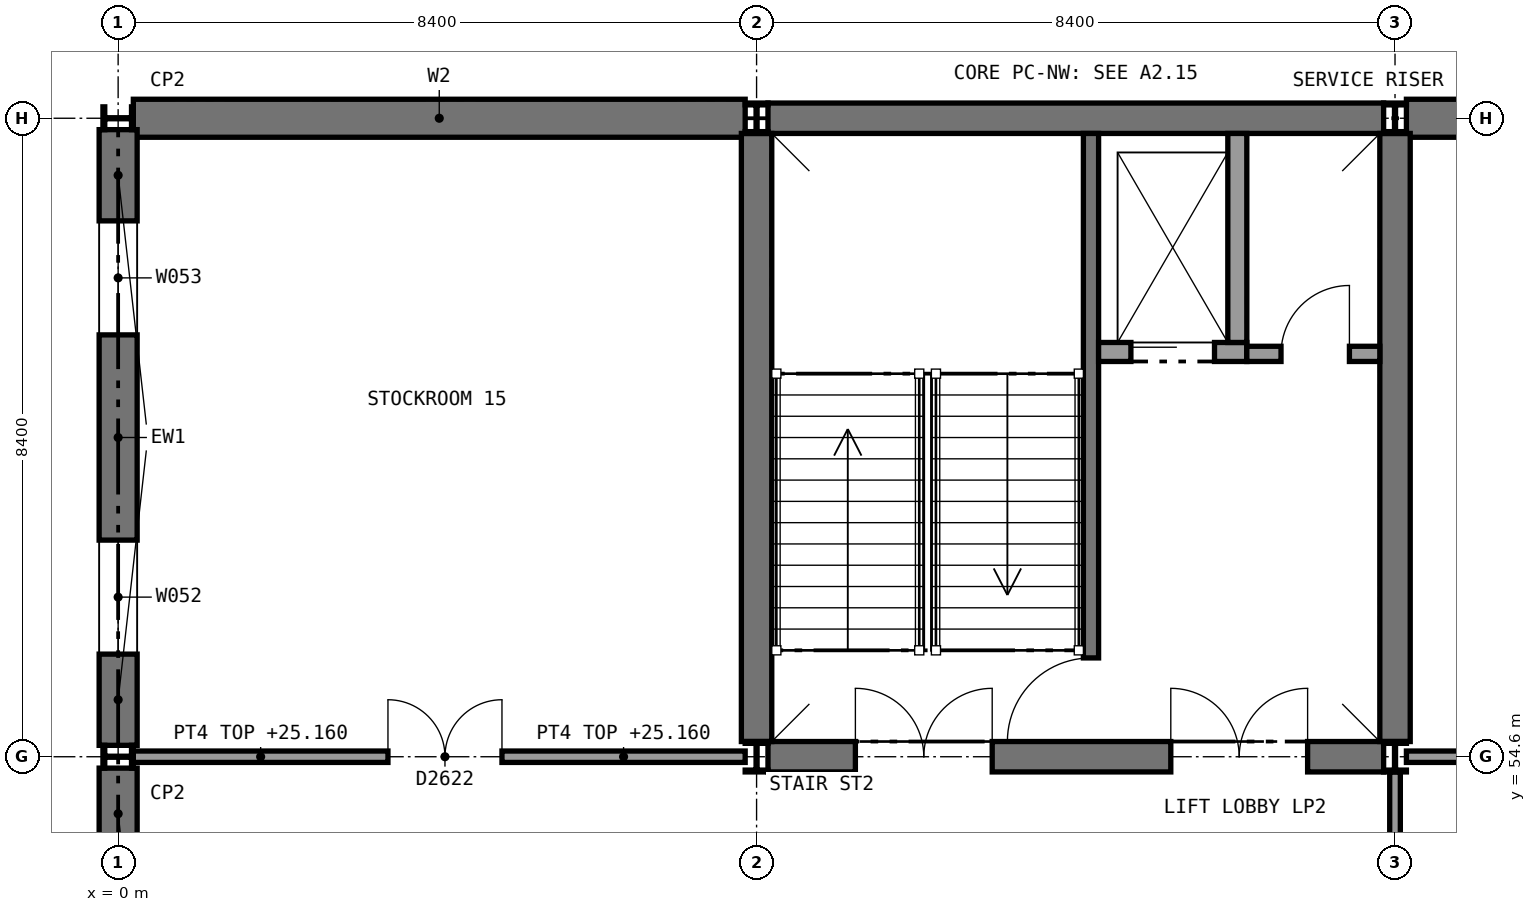
"""IFC4 building model, lengths in metres.
Left out: names, types, materials, properties, quantities, classifications, styles, units other than length and angle.
Written with IfcOpenShell. Run it as: python <this file> out.ifc"""

import sys

from ifc_helpers import new_model, si_unit, direction, frame, frame_2d, origin, origin_2d, place, context, subcontext, project, spatial, rectangle, i_section, extrude, element, fill, save


model = new_model("IFC4")
c1 = context("Model", 3, precision=1e-05, world=origin(), true_north=direction((0.0, 1.0)))
c2 = subcontext(c1, "Body", "Model", "MODEL_VIEW")
j1 = project(units=[si_unit("LENGTHUNIT", "METRE"), si_unit("PLANEANGLEUNIT", "RADIAN")], contexts=[c1])
p1 = place(None, origin())
s1 = spatial("IfcSite", under=j1, at=p1, CompositionType="ELEMENT")
p2 = place(p1, origin())
s2 = spatial("IfcBuilding", under=s1, at=p2, CompositionType="ELEMENT")
p3 = place(p2, frame((0.0, 0.0, 21.0)))
s3 = spatial("IfcBuildingStorey", under=s2, at=p3, CompositionType="ELEMENT", Elevation=21.0)
p4 = place(p3, frame((0.2, 63.0, 0.0), z_axis=(0.0, 0.0, 1.0), x_axis=(1.0, 0.0, 0.0)))
e1 = element("IfcWall", 1, at=p4, inside=s3, PredefinedType="SHEAR", context=c2, shape_type="SweptSolid", body=[
    extrude(rectangle(XDim=8.05, YDim=0.5, at=frame_2d((4.025, 0.0))), origin(), (0.0, 0.0, 1.0), 4.65),
])
p5 = place(p3, frame((16.95, 63.0, 0.0), z_axis=(0.0, 0.0, 1.0), x_axis=(1.0, 0.0, 0.0)))
e2 = element("IfcWall", 2, at=p5, inside=s3, PredefinedType="SHEAR", context=c2, shape_type="SweptSolid", body=[
    extrude(rectangle(XDim=8.1, YDim=0.5, at=frame_2d((4.05, 0.0))), origin(), (0.0, 0.0, 1.0), 4.65),
])
p6 = place(p3, frame((8.55, 63.0, 0.0), z_axis=(0.0, 0.0, 1.0), x_axis=(1.0, 0.0, 0.0)))
e3 = element("IfcWall", 3, at=p6, inside=s3, PredefinedType="SHEAR", context=c2, shape_type="SweptSolid", body=[
    extrude(rectangle(XDim=8.1, YDim=0.4, at=frame_2d((4.05, 0.0))), origin(), (0.0, 0.0, 1.0), 4.65),
])
p7 = place(p3, frame((8.55, 54.6, 0.0), z_axis=(0.0, 0.0, 1.0), x_axis=(1.0, 0.0, 0.0)))
e4 = element("IfcWall", 4, at=p7, inside=s3, PredefinedType="SHEAR", context=c2, shape_type="SweptSolid", body=[
    extrude(rectangle(XDim=8.1, YDim=0.4, at=frame_2d((4.05, 0.0))), origin(), (0.0, 0.0, 1.0), 4.65),
])
p8 = place(p7, frame((1.15, 0.0, 0.0)))
e5 = element("IfcOpeningElement", 5, at=p8, cuts=e4, PredefinedType="OPENING", context=c2, shape_type="SweptSolid", body=[
    extrude(rectangle(XDim=1.8, YDim=2.1, at=frame_2d((0.9, 1.05))), frame((0.0, 0.21, 0.0), z_axis=(0.0, -1.0, 0.0), x_axis=(1.0, 0.0, 0.0)), (0.0, 0.0, 1.0), 0.42),
])
p9 = place(p7, frame((5.3, 0.0, 0.0)))
e6 = element("IfcOpeningElement", 6, at=p9, cuts=e4, PredefinedType="OPENING", context=c2, shape_type="SweptSolid", body=[
    extrude(rectangle(XDim=1.8, YDim=2.1, at=frame_2d((0.9, 1.05))), frame((0.0, 0.21, 0.0), z_axis=(0.0, -1.0, 0.0), x_axis=(1.0, 0.0, 0.0)), (0.0, 0.0, 1.0), 0.42),
])
for number, where, z_axis, x_axis in (
    (7, (8.4, 54.8, 0.0), (0.0, 0.0, 1.0), (0.0, 1.0, 0.0)),
    (8, (16.8, 54.8, 0.0), (0.0, 0.0, 1.0), (0.0, 1.0, 0.0)),
):
    element("IfcWall", number, at=place(p3, frame(where, z_axis=z_axis, x_axis=x_axis)), inside=s3, PredefinedType="SHEAR", context=c2, shape_type="SweptSolid", body=[
        extrude(rectangle(XDim=8.0, YDim=0.4, at=frame_2d((4.0, 0.0))), origin(), (0.0, 0.0, 1.0), 4.65),
    ])
for number, where, z_axis, x_axis in (
    (9, (0.0, 54.6, 0.0), (0.0, 0.0, 1.0), (0.0, 1.0, 0.0)),
    (10, (0.0, 63.0, 0.0), (0.0, 0.0, 1.0), (0.0, 1.0, 0.0)),
    (11, (8.4, 54.6, 0.0), (0.0, 0.0, 1.0), (1.0, 0.0, 0.0)),
    (12, (8.4, 63.0, 0.0), (0.0, 0.0, 1.0), (1.0, 0.0, 0.0)),
    (13, (16.8, 54.6, 0.0), (0.0, 0.0, 1.0), (1.0, 0.0, 0.0)),
    (14, (16.8, 63.0, 0.0), (0.0, 0.0, 1.0), (1.0, 0.0, 0.0)),
):
    element("IfcColumn", number, at=place(p3, frame(where, z_axis=z_axis, x_axis=x_axis)), inside=s3, PredefinedType="COLUMN", context=c2, shape_type="SweptSolid", body=[
        extrude(i_section(OverallWidth=0.3, OverallDepth=0.4, WebThickness=0.013, FlangeThickness=0.024, FilletRadius=0.027, at=origin_2d()), origin(), (0.0, 0.0, 1.0), 4.8),
    ])
p10 = place(p3, frame((16.95, 54.6, 0.0), z_axis=(0.0, 0.0, 1.0), x_axis=(1.0, 0.0, 0.0)))
e15 = element("IfcWall", 15, at=p10, inside=s3, PredefinedType="SOLIDWALL", context=c2, shape_type="SweptSolid", body=[
    extrude(rectangle(XDim=8.1, YDim=0.15, at=frame_2d((4.05, 0.0))), origin(), (0.0, 0.0, 1.0), 4.3),
])
p11 = place(p10, frame((3.35, 0.0, 0.0)))
e16 = element("IfcOpeningElement", 16, at=p11, cuts=e15, PredefinedType="OPENING", context=c2, shape_type="SweptSolid", body=[
    extrude(rectangle(XDim=1.5, YDim=2.1, at=frame_2d((0.75, 1.05))), frame((0.0, 0.085, 0.0), z_axis=(0.0, -1.0, 0.0), x_axis=(1.0, 0.0, 0.0)), (0.0, 0.0, 1.0), 0.17),
])
p12 = place(p3, frame((0.2, 54.6, 0.0), z_axis=(0.0, 0.0, 1.0), x_axis=(1.0, 0.0, 0.0)))
e17 = element("IfcWall", 17, at=p12, inside=s3, PredefinedType="SOLIDWALL", context=c2, shape_type="SweptSolid", body=[
    extrude(rectangle(XDim=8.05, YDim=0.15, at=frame_2d((4.025, 0.0))), origin(), (0.0, 0.0, 1.0), 4.16),
])
p13 = place(p12, frame((3.35, 0.0, 0.0)))
e18 = element("IfcOpeningElement", 18, at=p13, cuts=e17, PredefinedType="OPENING", context=c2, shape_type="SweptSolid", body=[
    extrude(rectangle(XDim=1.5, YDim=2.1, at=frame_2d((0.75, 1.05))), frame((0.0, 0.085, 0.0), z_axis=(0.0, -1.0, 0.0), x_axis=(1.0, 0.0, 0.0)), (0.0, 0.0, 1.0), 0.17),
])
p14 = place(p3, frame((16.8, 51.3, 0.0), z_axis=(0.0, 0.0, 1.0), x_axis=(0.0, 1.0, 0.0)))
e19 = element("IfcWall", 19, at=p14, inside=s3, PredefinedType="PARTITIONING", context=c2, shape_type="SweptSolid", body=[
    extrude(rectangle(XDim=3.1, YDim=0.14, at=frame_2d((1.55, 0.0))), origin(), (0.0, 0.0, 1.0), 4.16),
])
p15 = place(p3, frame((0.0, 46.35, 0.0), z_axis=(0.0, 0.0, 1.0), x_axis=(0.0, 1.0, 0.0)))
e20 = element("IfcWall", 20, at=p15, inside=s3, PredefinedType="STANDARD", context=c2, shape_type="SweptSolid", body=[
    extrude(rectangle(XDim=8.1, YDim=0.5, at=frame_2d((4.05, 0.0))), origin(), (0.0, 0.0, 1.0), 4.65),
])
p16 = place(p15, frame((1.2, 0.0, 1.0)))
e21 = element("IfcOpeningElement", 21, at=p16, cuts=e20, PredefinedType="OPENING", context=c2, shape_type="SweptSolid", body=[
    extrude(rectangle(XDim=1.5, YDim=2.4, at=frame_2d((0.75, 1.2))), frame((0.0, 0.26, 0.0), z_axis=(0.0, -1.0, 0.0), x_axis=(1.0, 0.0, 0.0)), (0.0, 0.0, 1.0), 0.52),
])
p17 = place(p15, frame((5.4, 0.0, 1.0)))
e22 = element("IfcOpeningElement", 22, at=p17, cuts=e20, PredefinedType="OPENING", context=c2, shape_type="SweptSolid", body=[
    extrude(rectangle(XDim=1.5, YDim=2.4, at=frame_2d((0.75, 1.2))), frame((0.0, 0.26, 0.0), z_axis=(0.0, -1.0, 0.0), x_axis=(1.0, 0.0, 0.0)), (0.0, 0.0, 1.0), 0.52),
])
p18 = place(p3, frame((0.0, 54.75, 0.0), z_axis=(0.0, 0.0, 1.0), x_axis=(0.0, 1.0, 0.0)))
e23 = element("IfcWall", 23, at=p18, inside=s3, PredefinedType="STANDARD", context=c2, shape_type="SweptSolid", body=[
    extrude(rectangle(XDim=8.1, YDim=0.5, at=frame_2d((4.05, 0.0))), origin(), (0.0, 0.0, 1.0), 4.65),
])
p19 = place(p18, frame((1.2, 0.0, 1.0)))
e24 = element("IfcOpeningElement", 24, at=p19, cuts=e23, PredefinedType="OPENING", context=c2, shape_type="SweptSolid", body=[
    extrude(rectangle(XDim=1.5, YDim=2.4, at=frame_2d((0.75, 1.2))), frame((0.0, 0.26, 0.0), z_axis=(0.0, -1.0, 0.0), x_axis=(1.0, 0.0, 0.0)), (0.0, 0.0, 1.0), 0.52),
])
p20 = place(p18, frame((5.4, 0.0, 1.0)))
e25 = element("IfcOpeningElement", 25, at=p20, cuts=e23, PredefinedType="OPENING", context=c2, shape_type="SweptSolid", body=[
    extrude(rectangle(XDim=1.5, YDim=2.4, at=frame_2d((0.75, 1.2))), frame((0.0, 0.26, 0.0), z_axis=(0.0, -1.0, 0.0), x_axis=(1.0, 0.0, 0.0)), (0.0, 0.0, 1.0), 0.52),
])
p21 = place(p3, frame((12.8, 62.8, 0.0), z_axis=(0.0, 0.0, 1.0), x_axis=(0.0, -1.0, 0.0)))
e26 = element("IfcWall", 26, at=p21, inside=s3, PredefinedType="SHEAR", context=c2, shape_type="SweptSolid", body=[
    extrude(rectangle(XDim=8.0, YDim=0.2, at=frame_2d((4.0, 0.0))), origin(), (0.0, 0.0, 1.0), 4.65),
])
p22 = place(p21, frame((6.9, 0.0, 0.0)))
e27 = element("IfcOpeningElement", 27, at=p22, cuts=e26, PredefinedType="OPENING", context=c2, shape_type="SweptSolid", body=[
    extrude(rectangle(XDim=1.11, YDim=2.1, at=frame_2d((0.555, 1.05))), frame((0.0, 0.11, 0.0), z_axis=(0.0, -1.0, 0.0), x_axis=(1.0, 0.0, 0.0)), (0.0, 0.0, 1.0), 0.22),
])
p23 = place(p3, frame((12.9, 59.925, 0.0), z_axis=(0.0, 0.0, 1.0), x_axis=(1.0, 0.0, 0.0)))
e28 = element("IfcWall", 28, at=p23, inside=s3, PredefinedType="SOLIDWALL", context=c2, shape_type="SweptSolid", body=[
    extrude(rectangle(XDim=1.95, YDim=0.25, at=frame_2d((0.975, 0.0))), origin(), (0.0, 0.0, 1.0), 4.8),
])
p24 = place(p23, frame((0.425, 0.0, 0.0)))
e29 = element("IfcOpeningElement", 29, at=p24, cuts=e28, PredefinedType="OPENING", context=c2, shape_type="SweptSolid", body=[
    extrude(rectangle(XDim=1.1, YDim=2.1, at=frame_2d((0.55, 1.05))), frame((0.0, 0.135, 0.0), z_axis=(0.0, -1.0, 0.0), x_axis=(1.0, 0.0, 0.0)), (0.0, 0.0, 1.0), 0.27),
])
p25 = place(p3, frame((14.725, 62.8, 0.0), z_axis=(0.0, 0.0, 1.0), x_axis=(0.0, -1.0, 0.0)))
e30 = element("IfcWall", 30, at=p25, inside=s3, PredefinedType="SOLIDWALL", context=c2, shape_type="SweptSolid", body=[
    extrude(rectangle(XDim=2.75, YDim=0.25, at=frame_2d((1.375, 0.0))), origin(), (0.0, 0.0, 1.0), 4.8),
])
p26 = place(p3, frame((14.85, 59.9, 0.0), z_axis=(0.0, 0.0, 1.0), x_axis=(1.0, 0.0, 0.0)))
e31 = element("IfcWall", 31, at=p26, inside=s3, PredefinedType="PARTITIONING", context=c2, shape_type="SweptSolid", body=[
    extrude(rectangle(XDim=1.75, YDim=0.2, at=frame_2d((0.875, 0.0))), origin(), (0.0, 0.0, 1.0), 4.65),
])
p27 = place(p26, frame((0.45, 0.0, 0.0)))
e32 = element("IfcOpeningElement", 32, at=p27, cuts=e31, PredefinedType="OPENING", context=c2, shape_type="SweptSolid", body=[
    extrude(rectangle(XDim=0.9, YDim=2.1, at=frame_2d((0.45, 1.05))), frame((0.0, 0.11, 0.0), z_axis=(0.0, -1.0, 0.0), x_axis=(1.0, 0.0, 0.0)), (0.0, 0.0, 1.0), 0.22),
])
p28 = place(p13, origin())
e33 = element("IfcDoor", 33, at=p28, inside=s3, OperationType="DOUBLE_DOOR_SINGLE_SWING", PredefinedType="DOOR", context=c2, shape_type="SweptSolid", body=[
    extrude(rectangle(XDim=1.5, YDim=2.1, at=frame_2d((0.75, 1.05))), frame((0.0, 0.025, 0.0), z_axis=(0.0, -1.0, 0.0), x_axis=(1.0, 0.0, 0.0)), (0.0, 0.0, 1.0), 0.05),
])
fill(e18, e33)
p29 = place(p19, origin())
e34 = element("IfcWindow", 34, at=p29, inside=s3, PartitioningType="SINGLE_PANEL", PredefinedType="WINDOW", context=c2, shape_type="SweptSolid", body=[
    extrude(rectangle(XDim=1.5, YDim=2.4, at=frame_2d((0.75, 1.2))), frame((0.0, 0.03, 0.0), z_axis=(0.0, -1.0, 0.0), x_axis=(1.0, 0.0, 0.0)), (0.0, 0.0, 1.0), 0.06),
])
fill(e24, e34)
p30 = place(p20, origin())
e35 = element("IfcWindow", 35, at=p30, inside=s3, PartitioningType="SINGLE_PANEL", PredefinedType="WINDOW", context=c2, shape_type="SweptSolid", body=[
    extrude(rectangle(XDim=1.5, YDim=2.4, at=frame_2d((0.75, 1.2))), frame((0.0, 0.03, 0.0), z_axis=(0.0, -1.0, 0.0), x_axis=(1.0, 0.0, 0.0)), (0.0, 0.0, 1.0), 0.06),
])
fill(e25, e35)
p31 = place(p22, frame((1.1, 0.0, 0.0), z_axis=(0.0, 0.0, 1.0), x_axis=(-1.0, 0.0, 0.0)))
e36 = element("IfcDoor", 36, at=p31, inside=s3, OperationType="SINGLE_SWING_LEFT", PredefinedType="DOOR", context=c2, shape_type="SweptSolid", body=[
    extrude(rectangle(XDim=1.1, YDim=2.1, at=frame_2d((0.55, 1.05))), frame((0.0, 0.025, 0.0), z_axis=(0.0, -1.0, 0.0), x_axis=(1.0, 0.0, 0.0)), (0.0, 0.0, 1.0), 0.05),
])
fill(e27, e36)
p32 = place(p24, frame((1.1, 0.0, 0.0), z_axis=(0.0, 0.0, 1.0), x_axis=(-1.0, 0.0, 0.0)))
e37 = element("IfcDoor", 37, at=p32, inside=s3, OperationType="SLIDING_TO_RIGHT", PredefinedType="DOOR", context=c2, shape_type="SweptSolid", body=[
    extrude(rectangle(XDim=1.1, YDim=2.1, at=frame_2d((0.55, 1.05))), frame((0.0, 0.025, 0.0), z_axis=(0.0, -1.0, 0.0), x_axis=(1.0, 0.0, 0.0)), (0.0, 0.0, 1.0), 0.05),
])
fill(e29, e37)
p33 = place(p27, origin())
e38 = element("IfcDoor", 38, at=p33, inside=s3, OperationType="SINGLE_SWING_RIGHT", PredefinedType="DOOR", context=c2, shape_type="SweptSolid", body=[
    extrude(rectangle(XDim=0.9, YDim=2.1, at=frame_2d((0.45, 1.05))), frame((0.0, 0.025, 0.0), z_axis=(0.0, -1.0, 0.0), x_axis=(1.0, 0.0, 0.0)), (0.0, 0.0, 1.0), 0.05),
])
fill(e32, e38)
p34 = place(p8, origin())
e39 = element("IfcDoor", 39, at=p34, inside=s3, OperationType="DOUBLE_DOOR_SINGLE_SWING", PredefinedType="DOOR", context=c2, shape_type="SweptSolid", body=[
    extrude(rectangle(XDim=1.8, YDim=2.1, at=frame_2d((0.9, 1.05))), frame((0.0, 0.025, 0.0), z_axis=(0.0, -1.0, 0.0), x_axis=(1.0, 0.0, 0.0)), (0.0, 0.0, 1.0), 0.05),
])
fill(e5, e39)
p35 = place(p9, origin())
e40 = element("IfcDoor", 40, at=p35, inside=s3, OperationType="DOUBLE_DOOR_SINGLE_SWING", PredefinedType="DOOR", context=c2, shape_type="SweptSolid", body=[
    extrude(rectangle(XDim=1.8, YDim=2.1, at=frame_2d((0.9, 1.05))), frame((0.0, 0.025, 0.0), z_axis=(0.0, -1.0, 0.0), x_axis=(1.0, 0.0, 0.0)), (0.0, 0.0, 1.0), 0.05),
])
fill(e6, e40)
save(model, sys.argv[1])
